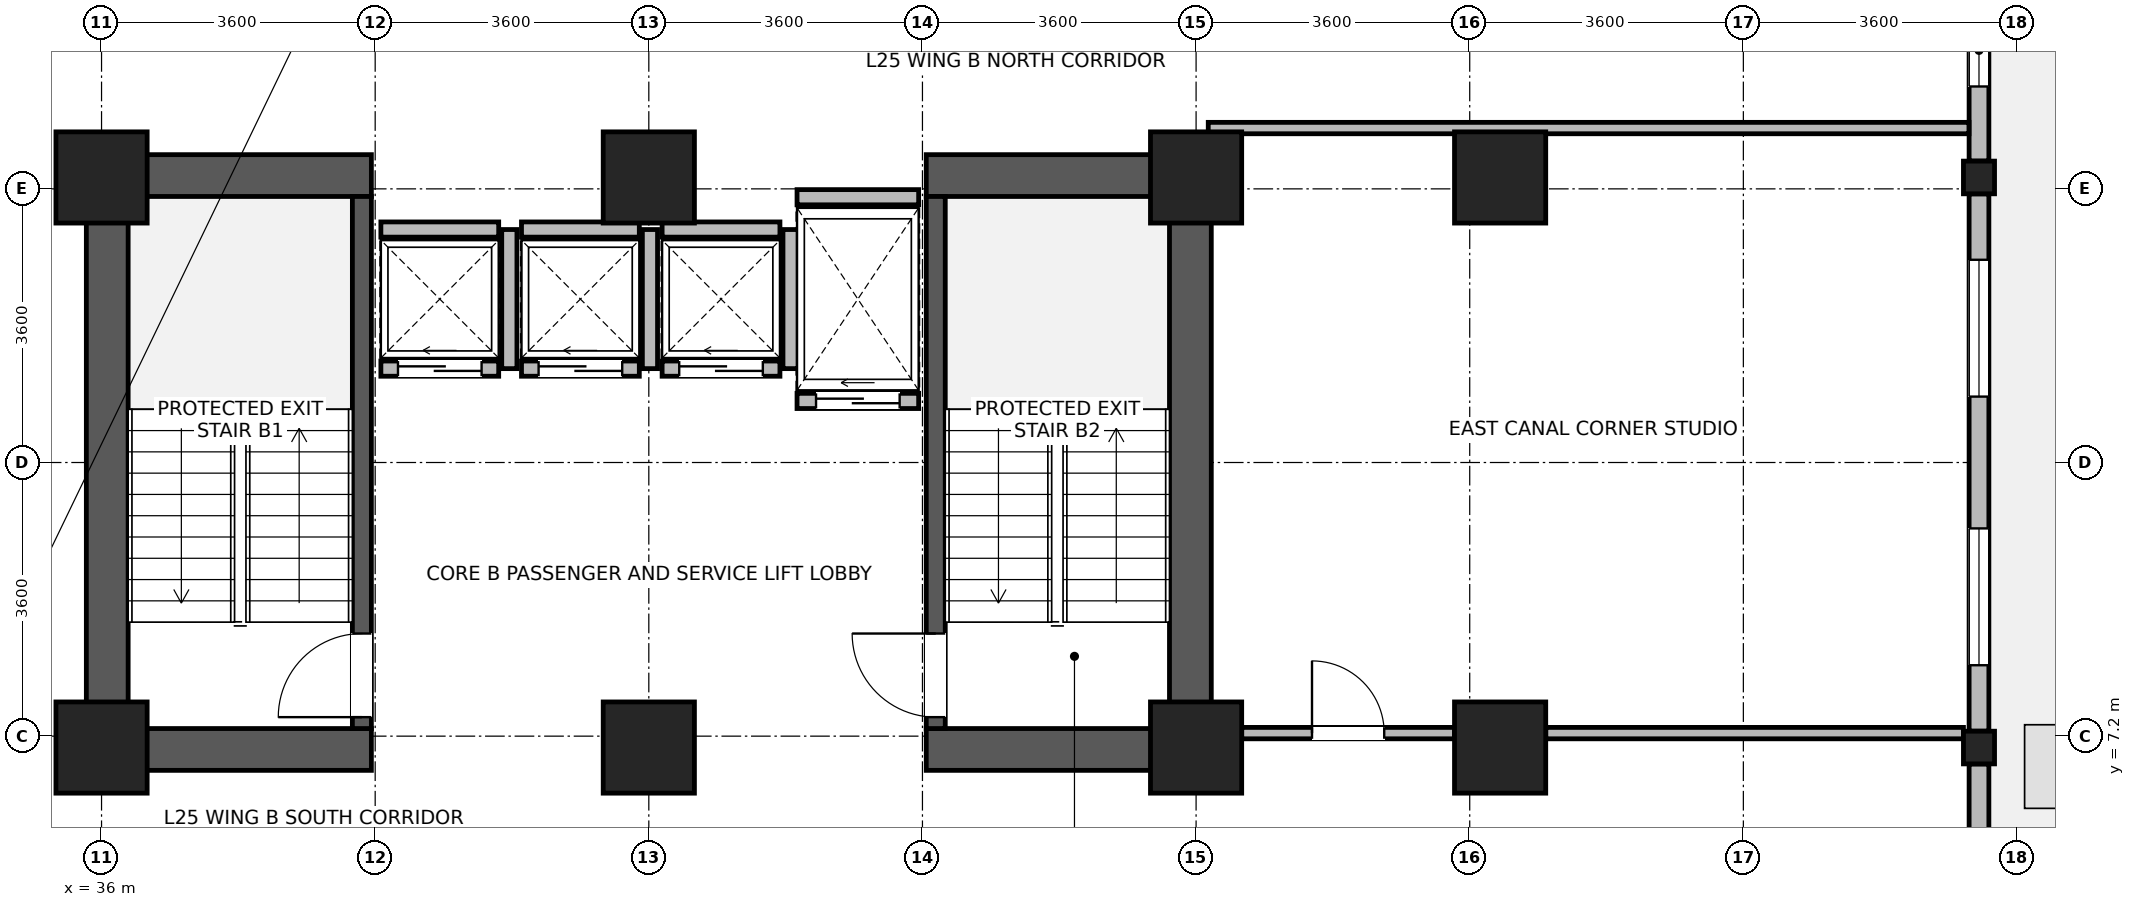
"""IFC4 building model, lengths in metres.
Left out: names, types, materials, properties, quantities, classifications, styles, units other than length and angle.
Written with IfcOpenShell. Run it as: python <this file> out.ifc"""

import sys

from ifc_helpers import new_model, si_unit, direction, frame, frame_2d, origin, origin_2d, place, context, subcontext, project, spatial, rectangle, i_section, extrude, source, transform, mapped, element, fill, save


model = new_model("IFC4")
c1 = context("Model", 3, precision=1e-05, world=origin(), true_north=direction((0.0, 1.0)))
c2 = subcontext(c1, "Body", "Model", "MODEL_VIEW")
j1 = project(units=[si_unit("LENGTHUNIT", "METRE"), si_unit("PLANEANGLEUNIT", "RADIAN")], contexts=[c1])
p1 = place(None, origin())
s1 = spatial("IfcSite", under=j1, at=p1, CompositionType="ELEMENT")
p2 = place(p1, origin())
s2 = spatial("IfcBuilding", under=s1, at=p2, CompositionType="ELEMENT")
p3 = place(p2, frame((0.0, 0.0, 100.8)))
s3 = spatial("IfcBuildingStorey", under=s2, at=p3, CompositionType="ELEMENT", Elevation=100.8)
for number, where, z_axis, x_axis in (
    (1, (36.075, 6.75, 0.0), (0.0, 0.0, 1.0), (0.0, 1.0, 0.0)),
    (2, (50.325, 6.75, 0.0), (0.0, 0.0, 1.0), (0.0, 1.0, 0.0)),
):
    element("IfcWall", number, at=place(p3, frame(where, z_axis=z_axis, x_axis=x_axis)), inside=s3, PredefinedType="SHEAR", context=c2, shape_type="SweptSolid", body=[
        extrude(rectangle(XDim=8.1, YDim=0.55, at=frame_2d((4.05, 0.0))), origin(), (0.0, 0.0, 1.0), 3.45),
    ])
for number, where, z_axis, x_axis in (
    (3, (36.35, 7.025, 0.0), (0.0, 0.0, 1.0), (1.0, 0.0, 0.0)),
    (4, (46.85, 7.025, 0.0), (0.0, 0.0, 1.0), (1.0, 0.0, 0.0)),
    (5, (36.35, 14.575, 0.0), (0.0, 0.0, 1.0), (1.0, 0.0, 0.0)),
    (6, (46.85, 14.575, 0.0), (0.0, 0.0, 1.0), (1.0, 0.0, 0.0)),
):
    element("IfcWall", number, at=place(p3, frame(where, z_axis=z_axis, x_axis=x_axis)), inside=s3, PredefinedType="SHEAR", context=c2, shape_type="SweptSolid", body=[
        extrude(rectangle(XDim=3.2, YDim=0.55, at=frame_2d((1.6, 0.0))), origin(), (0.0, 0.0, 1.0), 3.45),
    ])
p4 = place(p3, frame((39.425, 7.3, 0.0), z_axis=(0.0, 0.0, 1.0), x_axis=(0.0, 1.0, 0.0)))
e7 = element("IfcWall", 7, at=p4, inside=s3, PredefinedType="SHEAR", context=c2, shape_type="SweptSolid", body=[
    extrude(rectangle(XDim=7.0, YDim=0.25, at=frame_2d((3.5, 0.0))), origin(), (0.0, 0.0, 1.0), 3.45),
])
p5 = place(p4, frame((0.15, 0.0, 0.0)))
e8 = element("IfcOpeningElement", 8, at=p5, cuts=e7, PredefinedType="OPENING", context=c2, shape_type="SweptSolid", body=[
    extrude(rectangle(XDim=1.1, YDim=2.08, at=frame_2d((0.55, 1.04))), frame((0.0, 0.135, 0.0), z_axis=(0.0, -1.0, 0.0), x_axis=(1.0, 0.0, 0.0)), (0.0, 0.0, 1.0), 0.27),
])
p6 = place(p3, frame((46.975, 7.3, 0.0), z_axis=(0.0, 0.0, 1.0), x_axis=(0.0, 1.0, 0.0)))
e9 = element("IfcWall", 9, at=p6, inside=s3, PredefinedType="SHEAR", context=c2, shape_type="SweptSolid", body=[
    extrude(rectangle(XDim=7.0, YDim=0.25, at=frame_2d((3.5, 0.0))), origin(), (0.0, 0.0, 1.0), 3.45),
])
p7 = place(p6, frame((0.15, 0.0, 0.0)))
e10 = element("IfcOpeningElement", 10, at=p7, cuts=e9, PredefinedType="OPENING", context=c2, shape_type="SweptSolid", body=[
    extrude(rectangle(XDim=1.1, YDim=2.08, at=frame_2d((0.55, 1.04))), frame((0.0, 0.135, 0.0), z_axis=(0.0, -1.0, 0.0), x_axis=(1.0, 0.0, 0.0)), (0.0, 0.0, 1.0), 0.27),
])
m1 = source(origin(), c2, "Body", "SweptSolid", [
    extrude(rectangle(XDim=1.2, YDim=1.2, at=origin_2d()), origin(), (0.0, 0.0, 1.0), 3.7),
])
for number, where, z_axis, x_axis in (
    (11, (36.0, 7.05, 0.0), (0.0, 0.0, 1.0), (1.0, 0.0, 0.0)),
    (12, (36.0, 14.55, 0.0), (0.0, 0.0, 1.0), (1.0, 0.0, 0.0)),
    (13, (43.2, 7.05, 0.0), (0.0, 0.0, 1.0), (1.0, 0.0, 0.0)),
    (14, (43.2, 14.55, 0.0), (0.0, 0.0, 1.0), (1.0, 0.0, 0.0)),
    (15, (50.4, 7.05, 0.0), (0.0, 0.0, 1.0), (1.0, 0.0, 0.0)),
    (16, (50.4, 14.55, 0.0), (0.0, 0.0, 1.0), (1.0, 0.0, 0.0)),
    (17, (54.4, 7.05, 0.0), (0.0, 0.0, 1.0), (1.0, 0.0, 0.0)),
    (18, (54.4, 14.55, 0.0), (0.0, 0.0, 1.0), (1.0, 0.0, 0.0)),
):
    element("IfcColumn", number, at=place(p3, frame(where, z_axis=z_axis, x_axis=x_axis)), inside=s3, PredefinedType="COLUMN", context=c2, shape_type="MappedRepresentation", body=[
        mapped(m1, transform((0.0, 0.0, 0.0), x_axis=(1.0, 0.0, 0.0), y_axis=(0.0, 1.0, 0.0), z_axis=(0.0, 0.0, 1.0), scale=1.0)),
    ])
m2 = source(origin(), c2, "Body", "SweptSolid", [
    extrude(i_section(OverallWidth=0.409, OverallDepth=0.43, WebThickness=0.024, FlangeThickness=0.033, FilletRadius=0.015, at=origin_2d()), origin(), (0.0, 0.0, 1.0), 3.7),
])
for number, where, z_axis, x_axis in (
    (19, (60.7, 7.05, 0.0), (0.0, 0.0, 1.0), (1.0, 0.0, 0.0)),
    (20, (60.7, 14.55, 0.0), (0.0, 0.0, 1.0), (1.0, 0.0, 0.0)),
):
    element("IfcColumn", number, at=place(p3, frame(where, z_axis=z_axis, x_axis=x_axis)), inside=s3, PredefinedType="COLUMN", context=c2, shape_type="MappedRepresentation", body=[
        mapped(m2, transform((0.0, 0.0, 0.0), x_axis=(1.0, 0.0, 0.0), y_axis=(0.0, 1.0, 0.0), z_axis=(0.0, 0.0, 1.0), scale=1.0)),
    ])
p8 = place(p3, frame((60.7, 6.834, 0.0), z_axis=(0.0, 0.0, 1.0), x_axis=(0.0, -1.0, 0.0)))
e21 = element("IfcWall", 21, at=p8, inside=s3, PredefinedType="STANDARD", context=c2, shape_type="SweptSolid", body=[
    extrude(rectangle(XDim=5.164, YDim=0.26, at=frame_2d((2.582, 0.0))), origin(), (0.0, 0.0, 1.0), 3.43),
])
p9 = place(p8, frame((2.865, 0.0, 0.0)))
e22 = element("IfcOpeningElement", 22, at=p9, cuts=e21, PredefinedType="OPENING", context=c2, shape_type="SweptSolid", body=[
    extrude(rectangle(XDim=1.5, YDim=2.15, at=frame_2d((0.75, 1.075))), frame((0.0, 0.14, 0.0), z_axis=(0.0, -1.0, 0.0), x_axis=(1.0, 0.0, 0.0)), (0.0, 0.0, 1.0), 0.28),
])
p10 = place(p3, frame((60.7, 14.334, 0.0), z_axis=(0.0, 0.0, 1.0), x_axis=(0.0, -1.0, 0.0)))
e23 = element("IfcWall", 23, at=p10, inside=s3, PredefinedType="STANDARD", context=c2, shape_type="SweptSolid", body=[
    extrude(rectangle(XDim=7.068, YDim=0.26, at=frame_2d((3.534, 0.0))), origin(), (0.0, 0.0, 1.0), 2.98),
])
p11 = place(p10, frame((0.867, 0.0, 0.85)))
e24 = element("IfcOpeningElement", 24, at=p11, cuts=e23, PredefinedType="OPENING", context=c2, shape_type="SweptSolid", body=[
    extrude(rectangle(XDim=1.8, YDim=1.85, at=frame_2d((0.9, 0.925))), frame((0.0, 0.14, 0.0), z_axis=(0.0, -1.0, 0.0), x_axis=(1.0, 0.0, 0.0)), (0.0, 0.0, 1.0), 0.28),
])
p12 = place(p10, frame((4.401, 0.0, 0.85)))
e25 = element("IfcOpeningElement", 25, at=p12, cuts=e23, PredefinedType="OPENING", context=c2, shape_type="SweptSolid", body=[
    extrude(rectangle(XDim=1.8, YDim=1.85, at=frame_2d((0.9, 0.925))), frame((0.0, 0.14, 0.0), z_axis=(0.0, -1.0, 0.0), x_axis=(1.0, 0.0, 0.0)), (0.0, 0.0, 1.0), 0.28),
])
p13 = place(p3, frame((60.7, 21.384, 0.0), z_axis=(0.0, 0.0, 1.0), x_axis=(0.0, -1.0, 0.0)))
e26 = element("IfcWall", 26, at=p13, inside=s3, PredefinedType="STANDARD", context=c2, shape_type="SweptSolid", body=[
    extrude(rectangle(XDim=6.618, YDim=0.26, at=frame_2d((3.309, 0.0))), origin(), (0.0, 0.0, 1.0), 2.98),
])
p14 = place(p13, frame((0.754, 0.0, 0.85)))
e27 = element("IfcOpeningElement", 27, at=p14, cuts=e26, PredefinedType="OPENING", context=c2, shape_type="SweptSolid", body=[
    extrude(rectangle(XDim=1.8, YDim=1.85, at=frame_2d((0.9, 0.925))), frame((0.0, 0.14, 0.0), z_axis=(0.0, -1.0, 0.0), x_axis=(1.0, 0.0, 0.0)), (0.0, 0.0, 1.0), 0.28),
])
p15 = place(p13, frame((4.687, 0.0, 0.85)))
e28 = element("IfcOpeningElement", 28, at=p15, cuts=e26, PredefinedType="OPENING", context=c2, shape_type="SweptSolid", body=[
    extrude(rectangle(XDim=0.95, YDim=1.75, at=frame_2d((0.475, 0.875))), frame((0.0, 0.14, 0.0), z_axis=(0.0, -1.0, 0.0), x_axis=(1.0, 0.0, 0.0)), (0.0, 0.0, 1.0), 0.28),
])
p16 = place(p3, frame((39.675, 12.035, 0.0), z_axis=(0.0, 0.0, 1.0), x_axis=(1.0, 0.0, 0.0)))
e29 = element("IfcWall", 29, at=p16, inside=s3, PredefinedType="PARTITIONING", context=c2, shape_type="SweptSolid", body=[
    extrude(rectangle(XDim=1.55, YDim=0.2, at=frame_2d((0.775, 0.0))), origin(), (0.0, 0.0, 1.0), 3.43),
])
p17 = place(p16, frame((0.225, 0.0, 0.0)))
e30 = element("IfcOpeningElement", 30, at=p17, cuts=e29, PredefinedType="OPENING", context=c2, shape_type="SweptSolid", body=[
    extrude(rectangle(XDim=1.1, YDim=2.12, at=frame_2d((0.55, 1.06))), frame((0.0, 0.11, 0.0), z_axis=(0.0, -1.0, 0.0), x_axis=(1.0, 0.0, 0.0)), (0.0, 0.0, 1.0), 0.22),
])
p18 = place(p3, frame((39.675, 13.865, 0.0), z_axis=(0.0, 0.0, 1.0), x_axis=(1.0, 0.0, 0.0)))
e31 = element("IfcWall", 31, at=p18, inside=s3, PredefinedType="PARTITIONING", context=c2, shape_type="SweptSolid", body=[
    extrude(rectangle(XDim=1.55, YDim=0.2, at=frame_2d((0.775, 0.0))), origin(), (0.0, 0.0, 1.0), 3.43),
])
p19 = place(p3, frame((41.365, 12.035, 0.0), z_axis=(0.0, 0.0, 1.0), x_axis=(0.0, 1.0, 0.0)))
e32 = element("IfcWall", 32, at=p19, inside=s3, PredefinedType="PARTITIONING", context=c2, shape_type="SweptSolid", body=[
    extrude(rectangle(XDim=1.83, YDim=0.2, at=frame_2d((0.915, 0.0))), origin(), (0.0, 0.0, 1.0), 3.43),
])
p20 = place(p3, frame((41.525, 12.035, 0.0), z_axis=(0.0, 0.0, 1.0), x_axis=(1.0, 0.0, 0.0)))
e33 = element("IfcWall", 33, at=p20, inside=s3, PredefinedType="PARTITIONING", context=c2, shape_type="SweptSolid", body=[
    extrude(rectangle(XDim=1.55, YDim=0.2, at=frame_2d((0.775, 0.0))), origin(), (0.0, 0.0, 1.0), 3.43),
])
p21 = place(p20, frame((0.225, 0.0, 0.0)))
e34 = element("IfcOpeningElement", 34, at=p21, cuts=e33, PredefinedType="OPENING", context=c2, shape_type="SweptSolid", body=[
    extrude(rectangle(XDim=1.1, YDim=2.12, at=frame_2d((0.55, 1.06))), frame((0.0, 0.11, 0.0), z_axis=(0.0, -1.0, 0.0), x_axis=(1.0, 0.0, 0.0)), (0.0, 0.0, 1.0), 0.22),
])
p22 = place(p3, frame((41.525, 13.865, 0.0), z_axis=(0.0, 0.0, 1.0), x_axis=(1.0, 0.0, 0.0)))
e35 = element("IfcWall", 35, at=p22, inside=s3, PredefinedType="PARTITIONING", context=c2, shape_type="SweptSolid", body=[
    extrude(rectangle(XDim=1.55, YDim=0.2, at=frame_2d((0.775, 0.0))), origin(), (0.0, 0.0, 1.0), 3.43),
])
p23 = place(p3, frame((43.215, 12.035, 0.0), z_axis=(0.0, 0.0, 1.0), x_axis=(0.0, 1.0, 0.0)))
e36 = element("IfcWall", 36, at=p23, inside=s3, PredefinedType="PARTITIONING", context=c2, shape_type="SweptSolid", body=[
    extrude(rectangle(XDim=1.83, YDim=0.2, at=frame_2d((0.915, 0.0))), origin(), (0.0, 0.0, 1.0), 3.43),
])
p24 = place(p3, frame((43.375, 12.035, 0.0), z_axis=(0.0, 0.0, 1.0), x_axis=(1.0, 0.0, 0.0)))
e37 = element("IfcWall", 37, at=p24, inside=s3, PredefinedType="PARTITIONING", context=c2, shape_type="SweptSolid", body=[
    extrude(rectangle(XDim=1.55, YDim=0.2, at=frame_2d((0.775, 0.0))), origin(), (0.0, 0.0, 1.0), 3.43),
])
p25 = place(p24, frame((0.225, 0.0, 0.0)))
e38 = element("IfcOpeningElement", 38, at=p25, cuts=e37, PredefinedType="OPENING", context=c2, shape_type="SweptSolid", body=[
    extrude(rectangle(XDim=1.1, YDim=2.12, at=frame_2d((0.55, 1.06))), frame((0.0, 0.11, 0.0), z_axis=(0.0, -1.0, 0.0), x_axis=(1.0, 0.0, 0.0)), (0.0, 0.0, 1.0), 0.22),
])
p26 = place(p3, frame((43.375, 13.865, 0.0), z_axis=(0.0, 0.0, 1.0), x_axis=(1.0, 0.0, 0.0)))
e39 = element("IfcWall", 39, at=p26, inside=s3, PredefinedType="PARTITIONING", context=c2, shape_type="SweptSolid", body=[
    extrude(rectangle(XDim=1.55, YDim=0.2, at=frame_2d((0.775, 0.0))), origin(), (0.0, 0.0, 1.0), 3.43),
])
p27 = place(p3, frame((45.065, 12.035, 0.0), z_axis=(0.0, 0.0, 1.0), x_axis=(0.0, 1.0, 0.0)))
e40 = element("IfcWall", 40, at=p27, inside=s3, PredefinedType="PARTITIONING", context=c2, shape_type="SweptSolid", body=[
    extrude(rectangle(XDim=1.83, YDim=0.2, at=frame_2d((0.915, 0.0))), origin(), (0.0, 0.0, 1.0), 3.43),
])
p28 = place(p3, frame((45.15, 11.61, 0.0), z_axis=(0.0, 0.0, 1.0), x_axis=(1.0, 0.0, 0.0)))
e41 = element("IfcWall", 41, at=p28, inside=s3, PredefinedType="PARTITIONING", context=c2, shape_type="SweptSolid", body=[
    extrude(rectangle(XDim=1.6, YDim=0.2, at=frame_2d((0.8, 0.0))), origin(), (0.0, 0.0, 1.0), 3.43),
])
p29 = place(p28, frame((0.25, 0.0, 0.0)))
e42 = element("IfcOpeningElement", 42, at=p29, cuts=e41, PredefinedType="OPENING", context=c2, shape_type="SweptSolid", body=[
    extrude(rectangle(XDim=1.1, YDim=2.12, at=frame_2d((0.55, 1.06))), frame((0.0, 0.11, 0.0), z_axis=(0.0, -1.0, 0.0), x_axis=(1.0, 0.0, 0.0)), (0.0, 0.0, 1.0), 0.22),
])
p30 = place(p3, frame((45.15, 14.29, 0.0), z_axis=(0.0, 0.0, 1.0), x_axis=(1.0, 0.0, 0.0)))
e43 = element("IfcWall", 43, at=p30, inside=s3, PredefinedType="PARTITIONING", context=c2, shape_type="SweptSolid", body=[
    extrude(rectangle(XDim=1.6, YDim=0.2, at=frame_2d((0.8, 0.0))), origin(), (0.0, 0.0, 1.0), 2.43),
])
p31 = place(p3, frame((51.0, 7.24, 0.0), z_axis=(0.0, 0.0, 1.0), x_axis=(1.0, 0.0, 0.0)))
e44 = element("IfcWall", 44, at=p31, inside=s3, PredefinedType="PARTITIONING", context=c2, shape_type="SweptSolid", body=[
    extrude(rectangle(XDim=2.8, YDim=0.15, at=frame_2d((1.4, 0.0))), origin(), (0.0, 0.0, 1.0), 2.78),
])
p32 = place(p31, frame((0.925, 0.0, 0.0)))
e45 = element("IfcOpeningElement", 45, at=p32, cuts=e44, PredefinedType="OPENING", context=c2, shape_type="SweptSolid", body=[
    extrude(rectangle(XDim=0.95, YDim=2.1, at=frame_2d((0.475, 1.05))), frame((0.0, 0.085, 0.0), z_axis=(0.0, -1.0, 0.0), x_axis=(1.0, 0.0, 0.0)), (0.0, 0.0, 1.0), 0.17),
])
p33 = place(p3, frame((55.0, 7.24, 0.0), z_axis=(0.0, 0.0, 1.0), x_axis=(1.0, 0.0, 0.0)))
e46 = element("IfcWall", 46, at=p33, inside=s3, PredefinedType="PARTITIONING", context=c2, shape_type="SweptSolid", body=[
    extrude(rectangle(XDim=5.496, YDim=0.15, at=frame_2d((2.748, 0.0))), origin(), (0.0, 0.0, 1.0), 2.78),
])
p34 = place(p3, frame((50.56, 15.2, 0.0), z_axis=(0.0, 0.0, 1.0), x_axis=(1.0, 0.0, 0.0)))
e47 = element("IfcWall", 47, at=p34, inside=s3, PredefinedType="PARTITIONING", context=c2, shape_type="SweptSolid", body=[
    extrude(rectangle(XDim=10.008, YDim=0.15, at=frame_2d((5.004, 0.0))), origin(), (0.0, 0.0, 1.0), 3.43),
])
p35 = place(p11, origin())
e48 = element("IfcWindow", 48, at=p35, inside=s3, PartitioningType="SINGLE_PANEL", PredefinedType="WINDOW", context=c2, shape_type="SweptSolid", body=[
    extrude(rectangle(XDim=1.8, YDim=1.85, at=frame_2d((0.9, 0.925))), frame((0.0, 0.03, 0.0), z_axis=(0.0, -1.0, 0.0), x_axis=(1.0, 0.0, 0.0)), (0.0, 0.0, 1.0), 0.06),
])
fill(e24, e48)
p36 = place(p12, origin())
e49 = element("IfcWindow", 49, at=p36, inside=s3, PartitioningType="SINGLE_PANEL", PredefinedType="WINDOW", context=c2, shape_type="SweptSolid", body=[
    extrude(rectangle(XDim=1.8, YDim=1.85, at=frame_2d((0.9, 0.925))), frame((0.0, 0.03, 0.0), z_axis=(0.0, -1.0, 0.0), x_axis=(1.0, 0.0, 0.0)), (0.0, 0.0, 1.0), 0.06),
])
fill(e25, e49)
p37 = place(p15, origin())
e50 = element("IfcWindow", 50, at=p37, inside=s3, PartitioningType="SINGLE_PANEL", PredefinedType="WINDOW", context=c2, shape_type="SweptSolid", body=[
    extrude(rectangle(XDim=0.95, YDim=1.75, at=frame_2d((0.475, 0.875))), frame((0.0, 0.03, 0.0), z_axis=(0.0, -1.0, 0.0), x_axis=(1.0, 0.0, 0.0)), (0.0, 0.0, 1.0), 0.06),
])
fill(e28, e50)
p38 = place(p5, origin())
e51 = element("IfcDoor", 51, at=p38, inside=s3, OperationType="SINGLE_SWING_LEFT", PredefinedType="DOOR", context=c2, shape_type="SweptSolid", body=[
    extrude(rectangle(XDim=1.1, YDim=2.08, at=frame_2d((0.55, 1.04))), frame((0.0, 0.025, 0.0), z_axis=(0.0, -1.0, 0.0), x_axis=(1.0, 0.0, 0.0)), (0.0, 0.0, 1.0), 0.05),
])
fill(e8, e51)
p39 = place(p7, origin())
e52 = element("IfcDoor", 52, at=p39, inside=s3, OperationType="SINGLE_SWING_RIGHT", PredefinedType="DOOR", context=c2, shape_type="SweptSolid", body=[
    extrude(rectangle(XDim=1.1, YDim=2.08, at=frame_2d((0.55, 1.04))), frame((0.0, 0.025, 0.0), z_axis=(0.0, -1.0, 0.0), x_axis=(1.0, 0.0, 0.0)), (0.0, 0.0, 1.0), 0.05),
])
fill(e10, e52)
p40 = place(p17, origin())
e53 = element("IfcDoor", 53, at=p40, inside=s3, OperationType="SLIDING_TO_LEFT", PredefinedType="DOOR", context=c2, shape_type="SweptSolid", body=[
    extrude(rectangle(XDim=1.1, YDim=2.12, at=frame_2d((0.55, 1.06))), frame((0.0, 0.025, 0.0), z_axis=(0.0, -1.0, 0.0), x_axis=(1.0, 0.0, 0.0)), (0.0, 0.0, 1.0), 0.05),
])
fill(e30, e53)
p41 = place(p21, origin())
e54 = element("IfcDoor", 54, at=p41, inside=s3, OperationType="SLIDING_TO_LEFT", PredefinedType="DOOR", context=c2, shape_type="SweptSolid", body=[
    extrude(rectangle(XDim=1.1, YDim=2.12, at=frame_2d((0.55, 1.06))), frame((0.0, 0.025, 0.0), z_axis=(0.0, -1.0, 0.0), x_axis=(1.0, 0.0, 0.0)), (0.0, 0.0, 1.0), 0.05),
])
fill(e34, e54)
p42 = place(p25, origin())
e55 = element("IfcDoor", 55, at=p42, inside=s3, OperationType="SLIDING_TO_LEFT", PredefinedType="DOOR", context=c2, shape_type="SweptSolid", body=[
    extrude(rectangle(XDim=1.1, YDim=2.12, at=frame_2d((0.55, 1.06))), frame((0.0, 0.025, 0.0), z_axis=(0.0, -1.0, 0.0), x_axis=(1.0, 0.0, 0.0)), (0.0, 0.0, 1.0), 0.05),
])
fill(e38, e55)
p43 = place(p29, origin())
e56 = element("IfcDoor", 56, at=p43, inside=s3, OperationType="SLIDING_TO_LEFT", PredefinedType="DOOR", context=c2, shape_type="SweptSolid", body=[
    extrude(rectangle(XDim=1.1, YDim=2.12, at=frame_2d((0.55, 1.06))), frame((0.0, 0.025, 0.0), z_axis=(0.0, -1.0, 0.0), x_axis=(1.0, 0.0, 0.0)), (0.0, 0.0, 1.0), 0.05),
])
fill(e42, e56)
p44 = place(p32, origin())
e57 = element("IfcDoor", 57, at=p44, inside=s3, OperationType="SINGLE_SWING_LEFT", PredefinedType="DOOR", context=c2, shape_type="SweptSolid", body=[
    extrude(rectangle(XDim=0.95, YDim=2.1, at=frame_2d((0.475, 1.05))), frame((0.0, 0.025, 0.0), z_axis=(0.0, -1.0, 0.0), x_axis=(1.0, 0.0, 0.0)), (0.0, 0.0, 1.0), 0.05),
])
fill(e45, e57)
save(model, sys.argv[1])
